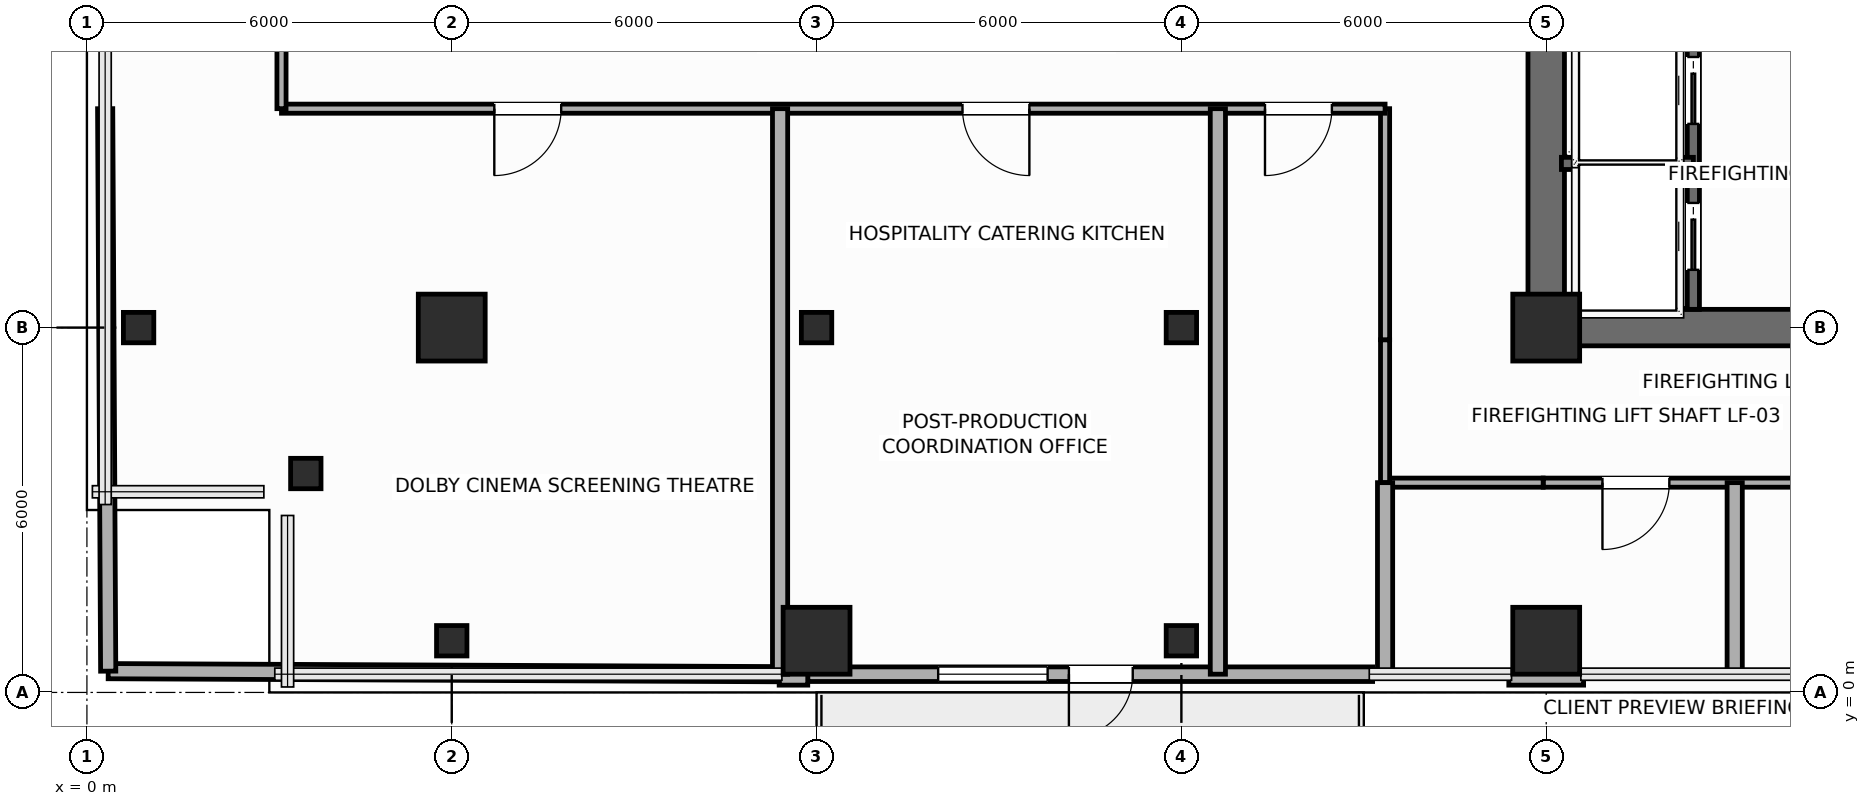
"""IFC4 building model, lengths in metres.
Left out: names, types, materials, properties, quantities, classifications, styles, units other than length and angle.
Written with IfcOpenShell. Run it as: python <this file> out.ifc"""

import sys

from ifc_helpers import new_model, si_unit, direction, frame, frame_2d, origin, origin_2d, place, context, subcontext, project, spatial, rectangle, hollow_rectangle, extrude, element, fill, save


model = new_model("IFC4")
c1 = context("Model", 3, precision=1e-05, world=origin(), true_north=direction((0.0, 1.0)))
c2 = subcontext(c1, "Body", "Model", "MODEL_VIEW")
j1 = project(units=[si_unit("LENGTHUNIT", "METRE"), si_unit("PLANEANGLEUNIT", "RADIAN")], contexts=[c1])
p1 = place(None, origin())
s1 = spatial("IfcSite", under=j1, at=p1, CompositionType="ELEMENT")
p2 = place(p1, origin())
s2 = spatial("IfcBuilding", under=s1, at=p2, CompositionType="ELEMENT")
p3 = place(p2, frame((0.0, 0.0, 126.9)))
s3 = spatial("IfcBuildingStorey", under=s2, at=p3, CompositionType="ELEMENT", Elevation=126.9)
p4 = place(p3, frame((24.0, 6.0, 0.0), z_axis=(0.0, 0.0, 1.0), x_axis=(1.0, 0.0, 0.0)))
e1 = element("IfcColumn", 1, at=p4, inside=s3, PredefinedType="COLUMN", context=c2, shape_type="SweptSolid", body=[
    extrude(rectangle(XDim=1.1, YDim=1.1, at=origin_2d()), origin(), (0.0, 0.0, 1.0), 3.75),
])
for number, where, z_axis, x_axis in (
    (2, (3.6, 3.6, 0.0), (0.0, 0.0, 1.0), (1.0, 0.0, 0.0)),
    (3, (0.85, 6.0, 0.0), (0.0, 0.0, 1.0), (1.0, 0.0, 0.0)),
    (4, (6.0, 0.85, 0.0), (0.0, 0.0, 1.0), (1.0, 0.0, 0.0)),
):
    element("IfcColumn", number, at=place(p3, frame(where, z_axis=z_axis, x_axis=x_axis)), inside=s3, PredefinedType="COLUMN", context=c2, shape_type="SweptSolid", body=[
        extrude(hollow_rectangle(XDim=0.5, YDim=0.5, WallThickness=0.025, InnerFilletRadius=0.025, OuterFilletRadius=0.04, at=origin_2d()), origin(), (0.0, 0.0, 1.0), 3.75),
    ])
for number, where, z_axis, x_axis in (
    (5, (6.0, 6.0, 0.0), (0.0, 0.0, 1.0), (1.0, 0.0, 0.0)),
    (6, (12.0, 0.85, 0.0), (0.0, 0.0, 1.0), (1.0, 0.0, 0.0)),
):
    element("IfcColumn", number, at=place(p3, frame(where, z_axis=z_axis, x_axis=x_axis)), inside=s3, PredefinedType="COLUMN", context=c2, shape_type="SweptSolid", body=[
        extrude(rectangle(XDim=1.1, YDim=1.1, at=origin_2d()), origin(), (0.0, 0.0, 1.0), 3.75),
    ])
for number, where, z_axis, x_axis in (
    (7, (12.0, 6.0, 0.0), (0.0, 0.0, 1.0), (1.0, 0.0, 0.0)),
    (8, (18.0, 0.85, 0.0), (0.0, 0.0, 1.0), (1.0, 0.0, 0.0)),
    (9, (18.0, 6.0, 0.0), (0.0, 0.0, 1.0), (1.0, 0.0, 0.0)),
):
    element("IfcColumn", number, at=place(p3, frame(where, z_axis=z_axis, x_axis=x_axis)), inside=s3, PredefinedType="COLUMN", context=c2, shape_type="SweptSolid", body=[
        extrude(hollow_rectangle(XDim=0.5, YDim=0.5, WallThickness=0.025, InnerFilletRadius=0.025, OuterFilletRadius=0.04, at=origin_2d()), origin(), (0.0, 0.0, 1.0), 3.75),
    ])
p5 = place(p3, frame((24.0, 0.85, 0.0), z_axis=(0.0, 0.0, 1.0), x_axis=(1.0, 0.0, 0.0)))
e10 = element("IfcColumn", 10, at=p5, inside=s3, PredefinedType="COLUMN", context=c2, shape_type="SweptSolid", body=[
    extrude(rectangle(XDim=1.1, YDim=1.1, at=origin_2d()), origin(), (0.0, 0.0, 1.0), 3.75),
])
p6 = place(p3, frame((21.145, 0.3, 0.0), z_axis=(0.0, 0.0, 1.0), x_axis=(-1.0, 0.0, 0.0)))
e11 = element("IfcWall", 11, at=p6, inside=s3, PredefinedType="SOLIDWALL", context=c2, shape_type="SweptSolid", body=[
    extrude(rectangle(XDim=9.29, YDim=0.24, at=frame_2d((4.645, 0.0))), origin(), (0.0, 0.0, 1.0), 3.525),
])
p7 = place(p6, frame((3.945, 0.0, 0.0)))
e12 = element("IfcOpeningElement", 12, at=p7, cuts=e11, PredefinedType="OPENING", context=c2, shape_type="SweptSolid", body=[
    extrude(rectangle(XDim=1.05, YDim=2.2, at=frame_2d((0.525, 1.1))), frame((0.0, 0.13, 0.0), z_axis=(0.0, -1.0, 0.0), x_axis=(1.0, 0.0, 0.0)), (0.0, 0.0, 1.0), 0.26),
])
p8 = place(p6, frame((5.345, 0.0, 0.85)))
e13 = element("IfcOpeningElement", 13, at=p8, cuts=e11, PredefinedType="OPENING", context=c2, shape_type="SweptSolid", body=[
    extrude(rectangle(XDim=1.8, YDim=2.1, at=frame_2d((0.9, 1.05))), frame((0.0, 0.13, 0.0), z_axis=(0.0, -1.0, 0.0), x_axis=(1.0, 0.0, 0.0)), (0.0, 0.0, 1.0), 0.26),
])
p9 = place(p3, frame((24.615, 0.24, 0.0), z_axis=(0.0, 0.0, 1.0), x_axis=(-1.0, 0.0, 0.0)))
e14 = element("IfcWall", 14, at=p9, inside=s3, PredefinedType="SOLIDWALL", context=c2, shape_type="SweptSolid", body=[
    extrude(rectangle(XDim=1.23, YDim=0.24, at=frame_2d((0.615, 0.0))), origin(), (0.0, 0.0, 1.0), 3.525),
])
p10 = place(p3, frame((11.855, 0.24, 0.0), z_axis=(0.0, 0.0, 1.0), x_axis=(-1.0, 0.0, 0.0)))
e15 = element("IfcWall", 15, at=p10, inside=s3, PredefinedType="SOLIDWALL", context=c2, shape_type="SweptSolid", body=[
    extrude(rectangle(XDim=0.47, YDim=0.24, at=frame_2d((0.235, 0.0))), origin(), (0.0, 0.0, 1.0), 3.525),
])
p11 = place(p3, frame((24.0, 6.0, 0.0), z_axis=(0.0, 0.0, 1.0), x_axis=(1.0, 0.0, 0.0)))
e16 = element("IfcWall", 16, at=p11, inside=s3, PredefinedType="SHEAR", context=c2, shape_type="SweptSolid", body=[
    extrude(rectangle(XDim=9.6, YDim=0.6, at=frame_2d((4.8, 0.0))), origin(), (0.0, 0.0, 1.0), 3.525),
])
p12 = place(p3, frame((24.0, 6.0, 0.0), z_axis=(0.0, 0.0, 1.0), x_axis=(0.0, 1.0, 0.0)))
e17 = element("IfcWall", 17, at=p12, inside=s3, PredefinedType="SHEAR", context=c2, shape_type="SweptSolid", body=[
    extrude(rectangle(XDim=12.0, YDim=0.6, at=frame_2d((6.0, 0.0))), origin(), (0.0, 0.0, 1.0), 3.525),
])
p13 = place(p12, frame((7.15, 0.0, 0.0)))
e18 = element("IfcOpeningElement", 18, at=p13, cuts=e17, PredefinedType="OPENING", context=c2, shape_type="SweptSolid", body=[
    extrude(rectangle(XDim=1.6, YDim=2.3, at=frame_2d((0.8, 1.15))), frame((0.0, 0.31, 0.0), z_axis=(0.0, -1.0, 0.0), x_axis=(1.0, 0.0, 0.0)), (0.0, 0.0, 1.0), 0.62),
])
p14 = place(p3, frame((26.42, 6.3, 0.0), z_axis=(0.0, 0.0, 1.0), x_axis=(0.0, 1.0, 0.0)))
e19 = element("IfcWall", 19, at=p14, inside=s3, PredefinedType="SHEAR", context=c2, shape_type="SweptSolid", body=[
    extrude(rectangle(XDim=4.95, YDim=0.2, at=frame_2d((2.475, 0.0))), origin(), (0.0, 0.0, 1.0), 3.525),
])
p15 = place(p14, frame((0.65, 0.0, 0.0)))
e20 = element("IfcOpeningElement", 20, at=p15, cuts=e19, PredefinedType="OPENING", context=c2, shape_type="SweptSolid", body=[
    extrude(rectangle(XDim=1.1, YDim=2.2, at=frame_2d((0.55, 1.1))), frame((0.0, 0.11, 0.0), z_axis=(0.0, -1.0, 0.0), x_axis=(1.0, 0.0, 0.0)), (0.0, 0.0, 1.0), 0.22),
])
p16 = place(p14, frame((3.05, 0.0, 0.0)))
e21 = element("IfcOpeningElement", 21, at=p16, cuts=e19, PredefinedType="OPENING", context=c2, shape_type="SweptSolid", body=[
    extrude(rectangle(XDim=1.1, YDim=2.2, at=frame_2d((0.55, 1.1))), frame((0.0, 0.11, 0.0), z_axis=(0.0, -1.0, 0.0), x_axis=(1.0, 0.0, 0.0)), (0.0, 0.0, 1.0), 0.22),
])
p17 = place(p3, frame((24.25, 8.7, 0.0), z_axis=(0.0, 0.0, 1.0), x_axis=(1.0, 0.0, 0.0)))
e22 = element("IfcWall", 22, at=p17, inside=s3, PredefinedType="SHEAR", context=c2, shape_type="SweptSolid", body=[
    extrude(rectangle(XDim=2.17, YDim=0.2, at=frame_2d((1.085, 0.0))), origin(), (0.0, 0.0, 1.0), 3.525),
])
p18 = place(p3, frame((36.15, 3.45, 0.0), z_axis=(0.0, 0.0, 1.0), x_axis=(-1.0, 0.0, 0.0)))
e23 = element("IfcWall", 23, at=p18, inside=s3, PredefinedType="PARTITIONING", context=c2, shape_type="SweptSolid", body=[
    extrude(rectangle(XDim=12.2, YDim=0.15, at=frame_2d((6.1, 0.0))), origin(), (0.0, 0.0, 1.0), 3.067),
])
p19 = place(p18, frame((10.125, 0.0, 0.0)))
e24 = element("IfcOpeningElement", 24, at=p19, cuts=e23, PredefinedType="OPENING", context=c2, shape_type="SweptSolid", body=[
    extrude(rectangle(XDim=1.1, YDim=2.25, at=frame_2d((0.55, 1.125))), frame((0.0, 0.085, 0.0), z_axis=(0.0, -1.0, 0.0), x_axis=(1.0, 0.0, 0.0)), (0.0, 0.0, 1.0), 0.17),
])
p20 = place(p18, frame((5.7, 0.0, 0.0)))
e25 = element("IfcOpeningElement", 25, at=p20, cuts=e23, PredefinedType="OPENING", context=c2, shape_type="SweptSolid", body=[
    extrude(rectangle(XDim=1.1, YDim=2.25, at=frame_2d((0.55, 1.125))), frame((0.0, 0.085, 0.0), z_axis=(0.0, -1.0, 0.0), x_axis=(1.0, 0.0, 0.0)), (0.0, 0.0, 1.0), 0.17),
])
p21 = place(p3, frame((23.95, 3.45, 0.0), z_axis=(0.0, 0.0, 1.0), x_axis=(-1.0, 0.0, 0.0)))
e26 = element("IfcWall", 26, at=p21, inside=s3, PredefinedType="PARTITIONING", context=c2, shape_type="SweptSolid", body=[
    extrude(rectangle(XDim=2.6, YDim=0.15, at=frame_2d((1.3, 0.0))), origin(), (0.0, 0.0, 1.0), 3.067),
])
p22 = place(p3, frame((21.35, 3.45, 0.0), z_axis=(0.0, 0.0, 1.0), x_axis=(0.0, 1.0, 0.0)))
e27 = element("IfcWall", 27, at=p22, inside=s3, PredefinedType="PARTITIONING", context=c2, shape_type="SweptSolid", body=[
    extrude(rectangle(XDim=2.35, YDim=0.15, at=frame_2d((1.175, 0.0))), origin(), (0.0, 0.0, 1.0), 3.525),
])
p23 = place(p3, frame((21.35, 5.8, 0.0), z_axis=(0.0, 0.0, 1.0), x_axis=(0.0, 1.0, 0.0)))
e28 = element("IfcWall", 28, at=p23, inside=s3, PredefinedType="PARTITIONING", context=c2, shape_type="SweptSolid", body=[
    extrude(rectangle(XDim=3.8, YDim=0.15, at=frame_2d((1.9, 0.0))), origin(), (0.0, 0.0, 1.0), 3.525),
])
p24 = place(p3, frame((21.35, 9.6, 0.0), z_axis=(0.0, 0.0, 1.0), x_axis=(-1.0, 0.0, 0.0)))
e29 = element("IfcWall", 29, at=p24, inside=s3, PredefinedType="PARTITIONING", context=c2, shape_type="SweptSolid", body=[
    extrude(rectangle(XDim=18.15, YDim=0.15, at=frame_2d((9.075, 0.0))), origin(), (0.0, 0.0, 1.0), 3.525),
])
p25 = place(p24, frame((13.55, 0.0, 0.0)))
e30 = element("IfcOpeningElement", 30, at=p25, cuts=e29, PredefinedType="OPENING", context=c2, shape_type="SweptSolid", body=[
    extrude(rectangle(XDim=1.1, YDim=2.25, at=frame_2d((0.55, 1.125))), frame((0.0, 0.085, 0.0), z_axis=(0.0, -1.0, 0.0), x_axis=(1.0, 0.0, 0.0)), (0.0, 0.0, 1.0), 0.17),
])
p26 = place(p24, frame((5.85, 0.0, 0.0)))
e31 = element("IfcOpeningElement", 31, at=p26, cuts=e29, PredefinedType="OPENING", context=c2, shape_type="SweptSolid", body=[
    extrude(rectangle(XDim=1.1, YDim=2.25, at=frame_2d((0.55, 1.125))), frame((0.0, 0.085, 0.0), z_axis=(0.0, -1.0, 0.0), x_axis=(1.0, 0.0, 0.0)), (0.0, 0.0, 1.0), 0.17),
])
p27 = place(p24, frame((0.875, 0.0, 0.0)))
e32 = element("IfcOpeningElement", 32, at=p27, cuts=e29, PredefinedType="OPENING", context=c2, shape_type="SweptSolid", body=[
    extrude(rectangle(XDim=1.1, YDim=2.25, at=frame_2d((0.55, 1.125))), frame((0.0, 0.085, 0.0), z_axis=(0.0, -1.0, 0.0), x_axis=(1.0, 0.0, 0.0)), (0.0, 0.0, 1.0), 0.17),
])
p28 = place(p3, frame((3.2, 9.6, 0.0), z_axis=(0.0, 0.0, 1.0), x_axis=(0.0, 1.0, 0.0)))
e33 = element("IfcWall", 33, at=p28, inside=s3, PredefinedType="PARTITIONING", context=c2, shape_type="SweptSolid", body=[
    extrude(rectangle(XDim=2.05, YDim=0.15, at=frame_2d((1.025, 0.0))), origin(), (0.0, 0.0, 1.0), 3.525),
])
for number, where, z_axis, x_axis in (
    (34, (21.35, 0.3, 0.0), (0.0, 0.0, 1.0), (0.0, 1.0, 0.0)),
    (35, (27.1, 0.3, 0.0), (0.0, 0.0, 1.0), (0.0, 1.0, 0.0)),
):
    element("IfcWall", number, at=place(p3, frame(where, z_axis=z_axis, x_axis=x_axis)), inside=s3, PredefinedType="PARTITIONING", context=c2, shape_type="SweptSolid", body=[
        extrude(rectangle(XDim=3.15, YDim=0.25, at=frame_2d((1.575, 0.0))), origin(), (0.0, 0.0, 1.0), 3.525),
    ])
p29 = place(p3, frame((0.35, 0.35, 0.0), z_axis=(0.0, 0.0, 1.0), x_axis=(0.999989714785, -0.004535451924, 0.0)))
e36 = element("IfcWall", 36, at=p29, inside=s3, PredefinedType="PARTITIONING", context=c2, shape_type="SweptSolid", body=[
    extrude(rectangle(XDim=11.035, YDim=0.25, at=frame_2d((5.518, 0.0))), origin(), (0.0, 0.0, 1.0), 3.525),
])
p30 = place(p3, frame((0.35, 0.35, 0.0), z_axis=(0.0, 0.0, 1.0), x_axis=(-0.005410604923, 0.99998536257, 0.0)))
e37 = element("IfcWall", 37, at=p30, inside=s3, PredefinedType="PARTITIONING", context=c2, shape_type="SweptSolid", body=[
    extrude(rectangle(XDim=9.25, YDim=0.25, at=frame_2d((4.625, 0.0))), origin(), (0.0, 0.0, 1.0), 3.525),
])
for number, where, z_axis, x_axis in (
    (38, (11.4, 0.3, 0.0), (0.0, 0.0, 1.0), (0.0, 1.0, 0.0)),
    (39, (18.6, 0.3, 0.0), (0.0, 0.0, 1.0), (0.0, 1.0, 0.0)),
):
    element("IfcWall", number, at=place(p3, frame(where, z_axis=z_axis, x_axis=x_axis)), inside=s3, PredefinedType="PARTITIONING", context=c2, shape_type="SweptSolid", body=[
        extrude(rectangle(XDim=9.3, YDim=0.25, at=frame_2d((4.65, 0.0))), origin(), (0.0, 0.0, 1.0), 3.525),
    ])
p31 = place(p7, origin())
e40 = element("IfcDoor", 40, at=p31, inside=s3, OperationType="SINGLE_SWING_RIGHT", PredefinedType="DOOR", context=c2, shape_type="SweptSolid", body=[
    extrude(rectangle(XDim=1.05, YDim=2.2, at=frame_2d((0.525, 1.1))), frame((0.0, 0.025, 0.0), z_axis=(0.0, -1.0, 0.0), x_axis=(1.0, 0.0, 0.0)), (0.0, 0.0, 1.0), 0.05),
])
fill(e12, e40)
p32 = place(p8, origin())
e41 = element("IfcWindow", 41, at=p32, inside=s3, PartitioningType="SINGLE_PANEL", PredefinedType="WINDOW", context=c2, shape_type="SweptSolid", body=[
    extrude(rectangle(XDim=1.8, YDim=2.1, at=frame_2d((0.9, 1.05))), frame((0.0, 0.03, 0.0), z_axis=(0.0, -1.0, 0.0), x_axis=(1.0, 0.0, 0.0)), (0.0, 0.0, 1.0), 0.06),
])
fill(e13, e41)
p33 = place(p15, origin())
e42 = element("IfcDoor", 42, at=p33, inside=s3, OperationType="SLIDING_TO_LEFT", PredefinedType="DOOR", context=c2, shape_type="SweptSolid", body=[
    extrude(rectangle(XDim=1.1, YDim=2.2, at=frame_2d((0.55, 1.1))), frame((0.0, 0.025, 0.0), z_axis=(0.0, -1.0, 0.0), x_axis=(1.0, 0.0, 0.0)), (0.0, 0.0, 1.0), 0.05),
])
fill(e20, e42)
p34 = place(p16, origin())
e43 = element("IfcDoor", 43, at=p34, inside=s3, OperationType="SLIDING_TO_LEFT", PredefinedType="DOOR", context=c2, shape_type="SweptSolid", body=[
    extrude(rectangle(XDim=1.1, YDim=2.2, at=frame_2d((0.55, 1.1))), frame((0.0, 0.025, 0.0), z_axis=(0.0, -1.0, 0.0), x_axis=(1.0, 0.0, 0.0)), (0.0, 0.0, 1.0), 0.05),
])
fill(e21, e43)
p35 = place(p19, origin())
e44 = element("IfcDoor", 44, at=p35, inside=s3, OperationType="SINGLE_SWING_RIGHT", PredefinedType="DOOR", context=c2, shape_type="SweptSolid", body=[
    extrude(rectangle(XDim=1.1, YDim=2.25, at=frame_2d((0.55, 1.125))), frame((0.0, 0.025, 0.0), z_axis=(0.0, -1.0, 0.0), x_axis=(1.0, 0.0, 0.0)), (0.0, 0.0, 1.0), 0.05),
])
fill(e24, e44)
p36 = place(p25, origin())
e45 = element("IfcDoor", 45, at=p36, inside=s3, OperationType="SINGLE_SWING_RIGHT", PredefinedType="DOOR", context=c2, shape_type="SweptSolid", body=[
    extrude(rectangle(XDim=1.1, YDim=2.25, at=frame_2d((0.55, 1.125))), frame((0.0, 0.025, 0.0), z_axis=(0.0, -1.0, 0.0), x_axis=(1.0, 0.0, 0.0)), (0.0, 0.0, 1.0), 0.05),
])
fill(e30, e45)
p37 = place(p26, origin())
e46 = element("IfcDoor", 46, at=p37, inside=s3, OperationType="SINGLE_SWING_LEFT", PredefinedType="DOOR", context=c2, shape_type="SweptSolid", body=[
    extrude(rectangle(XDim=1.1, YDim=2.25, at=frame_2d((0.55, 1.125))), frame((0.0, 0.025, 0.0), z_axis=(0.0, -1.0, 0.0), x_axis=(1.0, 0.0, 0.0)), (0.0, 0.0, 1.0), 0.05),
])
fill(e31, e46)
p38 = place(p27, origin())
e47 = element("IfcDoor", 47, at=p38, inside=s3, OperationType="SINGLE_SWING_RIGHT", PredefinedType="DOOR", context=c2, shape_type="SweptSolid", body=[
    extrude(rectangle(XDim=1.1, YDim=2.25, at=frame_2d((0.55, 1.125))), frame((0.0, 0.025, 0.0), z_axis=(0.0, -1.0, 0.0), x_axis=(1.0, 0.0, 0.0)), (0.0, 0.0, 1.0), 0.05),
])
fill(e32, e47)
save(model, sys.argv[1])
